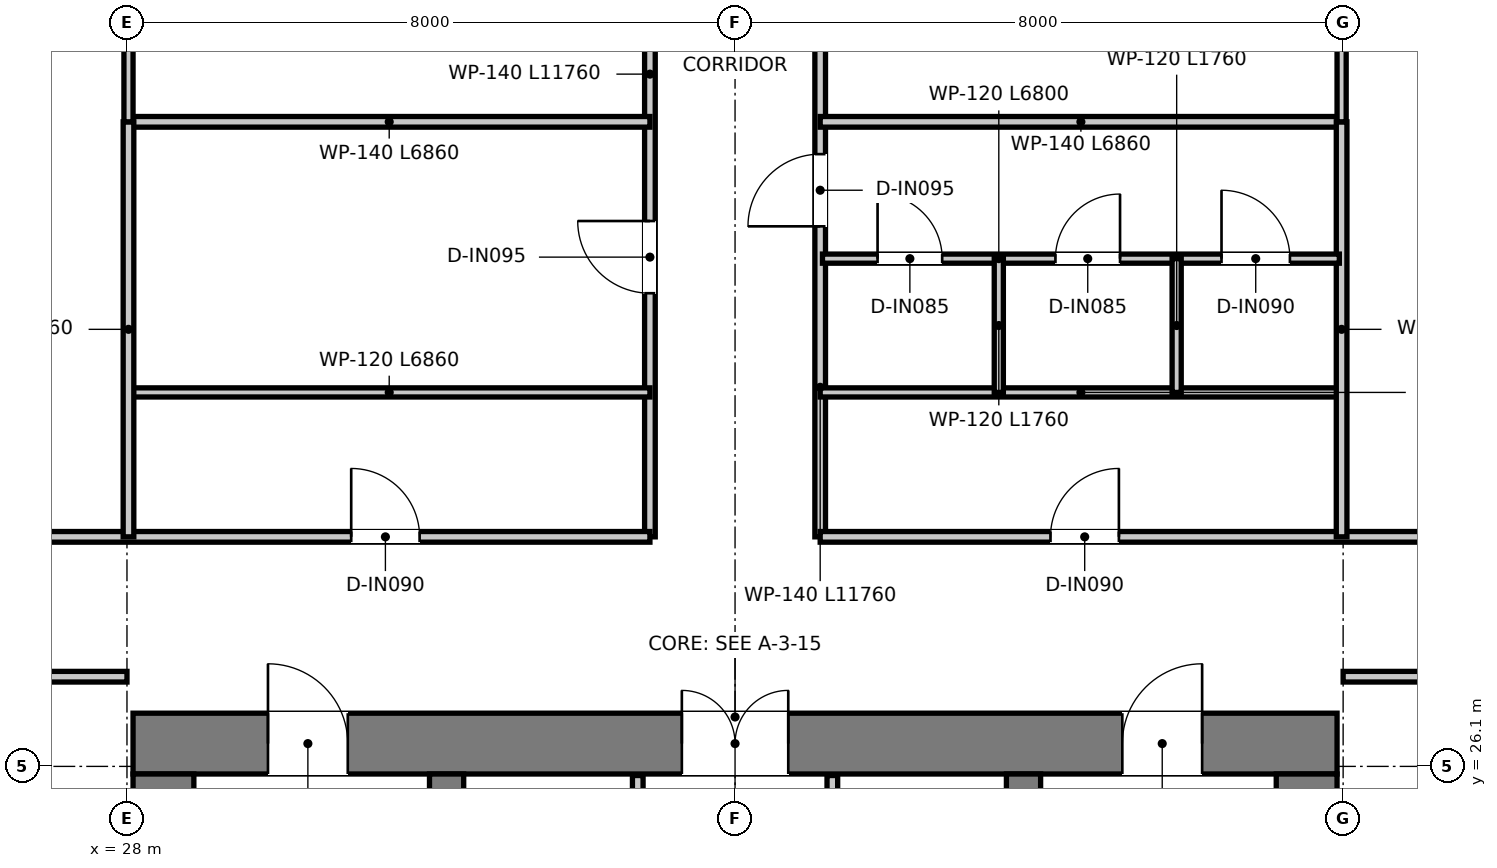
"""IFC4 building model, lengths in metres.
Left out: names, types, materials, properties, quantities, classifications, styles, units other than length and angle.
Written with IfcOpenShell. Run it as: python <this file> out.ifc"""

import sys

from ifc_helpers import new_model, si_unit, direction, frame, frame_2d, origin, place, context, subcontext, project, spatial, rectangle, extrude, element, fill, save


model = new_model("IFC4")
c1 = context("Model", 3, precision=1e-05, world=origin(), true_north=direction((0.0, 1.0)))
c2 = subcontext(c1, "Body", "Model", "MODEL_VIEW")
j1 = project(units=[si_unit("LENGTHUNIT", "METRE"), si_unit("PLANEANGLEUNIT", "RADIAN")], contexts=[c1])
p1 = place(None, origin())
s1 = spatial("IfcSite", under=j1, at=p1, CompositionType="ELEMENT")
p2 = place(p1, origin())
s2 = spatial("IfcBuilding", under=s1, at=p2, CompositionType="ELEMENT")
p3 = place(p2, frame((0.0, 0.0, 193.6)))
s3 = spatial("IfcBuildingStorey", under=s2, at=p3, CompositionType="ELEMENT", Elevation=193.6)
p4 = place(p3, frame((28.08, 26.4, 0.0), z_axis=(0.0, 0.0, 1.0), x_axis=(1.0, 0.0, 0.0)))
e1 = element("IfcWall", 1, at=p4, inside=s3, PredefinedType="SHEAR", context=c2, shape_type="SweptSolid", body=[
    extrude(rectangle(XDim=15.84, YDim=0.8, at=frame_2d((7.92, 0.0))), origin(), (0.0, 0.0, 1.0), 3.95),
])
p5 = place(p4, frame((7.22, 0.0, 0.0)))
e2 = element("IfcOpeningElement", 2, at=p5, cuts=e1, PredefinedType="OPENING", context=c2, shape_type="SweptSolid", body=[
    extrude(rectangle(XDim=1.4, YDim=2.2, at=frame_2d((0.7, 1.1))), frame((0.0, 0.41, 0.0), z_axis=(0.0, -1.0, 0.0), x_axis=(1.0, 0.0, 0.0)), (0.0, 0.0, 1.0), 0.82),
])
p6 = place(p4, frame((1.775, 0.0, 0.0)))
e3 = element("IfcOpeningElement", 3, at=p6, cuts=e1, PredefinedType="OPENING", context=c2, shape_type="SweptSolid", body=[
    extrude(rectangle(XDim=1.05, YDim=2.1, at=frame_2d((0.525, 1.05))), frame((0.0, 0.41, 0.0), z_axis=(0.0, -1.0, 0.0), x_axis=(1.0, 0.0, 0.0)), (0.0, 0.0, 1.0), 0.82),
])
p7 = place(p4, frame((13.015, 0.0, 0.0)))
e4 = element("IfcOpeningElement", 4, at=p7, cuts=e1, PredefinedType="OPENING", context=c2, shape_type="SweptSolid", body=[
    extrude(rectangle(XDim=1.05, YDim=2.1, at=frame_2d((0.525, 1.05))), frame((0.0, 0.41, 0.0), z_axis=(0.0, -1.0, 0.0), x_axis=(1.0, 0.0, 0.0)), (0.0, 0.0, 1.0), 0.82),
])
for number, where, z_axis, x_axis in (
    (5, (28.48, 11.3, 0.0), (0.0, 0.0, 1.0), (0.0, 1.0, 0.0)),
    (6, (43.52, 11.3, 0.0), (0.0, 0.0, 1.0), (0.0, 1.0, 0.0)),
):
    element("IfcWall", number, at=place(p3, frame(where, z_axis=z_axis, x_axis=x_axis)), inside=s3, PredefinedType="SHEAR", context=c2, shape_type="SweptSolid", body=[
        extrude(rectangle(XDim=14.7, YDim=0.8, at=frame_2d((7.35, 0.0))), origin(), (0.0, 0.0, 1.0), 3.95),
    ])
p8 = place(p3, frame((32.205, 13.22, 0.0), z_axis=(0.0, 0.0, 1.0), x_axis=(0.0, 1.0, 0.0)))
e7 = element("IfcWall", 7, at=p8, inside=s3, PredefinedType="SHEAR", context=c2, shape_type="SweptSolid", body=[
    extrude(rectangle(XDim=12.78, YDim=0.45, at=frame_2d((6.39, 0.0))), origin(), (0.0, 0.0, 1.0), 3.95),
])
p9 = place(p8, frame((10.58, 0.0, 0.0)))
e8 = element("IfcOpeningElement", 8, at=p9, cuts=e7, PredefinedType="OPENING", context=c2, shape_type="SweptSolid", body=[
    extrude(rectangle(XDim=1.1, YDim=2.15, at=frame_2d((0.55, 1.075))), frame((0.0, 0.235, 0.0), z_axis=(0.0, -1.0, 0.0), x_axis=(1.0, 0.0, 0.0)), (0.0, 0.0, 1.0), 0.47),
])
p10 = place(p3, frame((39.795, 13.22, 0.0), z_axis=(0.0, 0.0, 1.0), x_axis=(0.0, 1.0, 0.0)))
e9 = element("IfcWall", 9, at=p10, inside=s3, PredefinedType="SHEAR", context=c2, shape_type="SweptSolid", body=[
    extrude(rectangle(XDim=12.78, YDim=0.45, at=frame_2d((6.39, 0.0))), origin(), (0.0, 0.0, 1.0), 3.95),
])
p11 = place(p10, frame((10.58, 0.0, 0.0)))
e10 = element("IfcOpeningElement", 10, at=p11, cuts=e9, PredefinedType="OPENING", context=c2, shape_type="SweptSolid", body=[
    extrude(rectangle(XDim=1.1, YDim=2.15, at=frame_2d((0.55, 1.075))), frame((0.0, 0.235, 0.0), z_axis=(0.0, -1.0, 0.0), x_axis=(1.0, 0.0, 0.0)), (0.0, 0.0, 1.0), 0.47),
])
p12 = place(p3, frame((34.72, 20.2, 0.0), z_axis=(0.0, 0.0, 1.0), x_axis=(0.0, 1.0, 0.0)))
e11 = element("IfcWall", 11, at=p12, inside=s3, PredefinedType="PARTITIONING", context=c2, shape_type="SweptSolid", body=[
    extrude(rectangle(XDim=5.78, YDim=0.14, at=frame_2d((2.89, 0.0))), origin(), (0.0, 0.0, 1.0), 2.67),
])
p13 = place(p12, frame((1.05, 0.0, 0.0)))
e12 = element("IfcOpeningElement", 12, at=p13, cuts=e11, PredefinedType="OPENING", context=c2, shape_type="SweptSolid", body=[
    extrude(rectangle(XDim=0.9, YDim=2.1, at=frame_2d((0.45, 1.05))), frame((0.0, 0.08, 0.0), z_axis=(0.0, -1.0, 0.0), x_axis=(1.0, 0.0, 0.0)), (0.0, 0.0, 1.0), 0.16),
])
p14 = place(p3, frame((37.28, 20.2, 0.0), z_axis=(0.0, 0.0, 1.0), x_axis=(0.0, 1.0, 0.0)))
e13 = element("IfcWall", 13, at=p14, inside=s3, PredefinedType="PARTITIONING", context=c2, shape_type="SweptSolid", body=[
    extrude(rectangle(XDim=5.78, YDim=0.14, at=frame_2d((2.89, 0.0))), origin(), (0.0, 0.0, 1.0), 2.67),
])
p15 = place(p14, frame((0.95, 0.0, 0.0)))
e14 = element("IfcOpeningElement", 14, at=p15, cuts=e13, PredefinedType="OPENING", context=c2, shape_type="SweptSolid", body=[
    extrude(rectangle(XDim=1.1, YDim=2.15, at=frame_2d((0.55, 1.075))), frame((0.0, 0.08, 0.0), z_axis=(0.0, -1.0, 0.0), x_axis=(1.0, 0.0, 0.0)), (0.0, 0.0, 1.0), 0.16),
])
p16 = place(p3, frame((34.88, 29.12, 0.0), z_axis=(0.0, 0.0, 1.0), x_axis=(0.0, 1.0, 0.0)))
e15 = element("IfcWall", 15, at=p16, inside=s3, PredefinedType="PARTITIONING", context=c2, shape_type="SweptSolid", body=[
    extrude(rectangle(XDim=11.76, YDim=0.14, at=frame_2d((5.88, 0.0))), origin(), (0.0, 0.0, 1.0), 3.03),
])
p17 = place(p16, frame((3.205, 0.0, 0.0)))
e16 = element("IfcOpeningElement", 16, at=p17, cuts=e15, PredefinedType="OPENING", context=c2, shape_type="SweptSolid", body=[
    extrude(rectangle(XDim=0.95, YDim=2.1, at=frame_2d((0.475, 1.05))), frame((0.0, 0.08, 0.0), z_axis=(0.0, -1.0, 0.0), x_axis=(1.0, 0.0, 0.0)), (0.0, 0.0, 1.0), 0.16),
])
p18 = place(p16, frame((8.02, 0.0, 0.0)))
e17 = element("IfcOpeningElement", 17, at=p18, cuts=e15, PredefinedType="OPENING", context=c2, shape_type="SweptSolid", body=[
    extrude(rectangle(XDim=0.9, YDim=2.1, at=frame_2d((0.45, 1.05))), frame((0.0, 0.08, 0.0), z_axis=(0.0, -1.0, 0.0), x_axis=(1.0, 0.0, 0.0)), (0.0, 0.0, 1.0), 0.16),
])
p19 = place(p3, frame((37.12, 29.12, 0.0), z_axis=(0.0, 0.0, 1.0), x_axis=(0.0, 1.0, 0.0)))
e18 = element("IfcWall", 18, at=p19, inside=s3, PredefinedType="PARTITIONING", context=c2, shape_type="SweptSolid", body=[
    extrude(rectangle(XDim=11.76, YDim=0.14, at=frame_2d((5.88, 0.0))), origin(), (0.0, 0.0, 1.0), 3.03),
])
p20 = place(p19, frame((4.085, 0.0, 0.0)))
e19 = element("IfcOpeningElement", 19, at=p20, cuts=e18, PredefinedType="OPENING", context=c2, shape_type="SweptSolid", body=[
    extrude(rectangle(XDim=0.95, YDim=2.1, at=frame_2d((0.475, 1.05))), frame((0.0, 0.08, 0.0), z_axis=(0.0, -1.0, 0.0), x_axis=(1.0, 0.0, 0.0)), (0.0, 0.0, 1.0), 0.16),
])
p21 = place(p19, frame((8.02, 0.0, 0.0)))
e20 = element("IfcOpeningElement", 20, at=p21, cuts=e18, PredefinedType="OPENING", context=c2, shape_type="SweptSolid", body=[
    extrude(rectangle(XDim=0.9, YDim=2.1, at=frame_2d((0.45, 1.05))), frame((0.0, 0.08, 0.0), z_axis=(0.0, -1.0, 0.0), x_axis=(1.0, 0.0, 0.0)), (0.0, 0.0, 1.0), 0.16),
])
p22 = place(p3, frame((10.765, 29.12, 0.0), z_axis=(0.0, 0.0, 1.0), x_axis=(1.0, 0.0, 0.0)))
e21 = element("IfcWall", 21, at=p22, inside=s3, PredefinedType="PARTITIONING", context=c2, shape_type="SweptSolid", body=[
    extrude(rectangle(XDim=24.115, YDim=0.14, at=frame_2d((12.058, 0.0))), origin(), (0.0, 0.0, 1.0), 3.03),
])
p23 = place(p22, frame((20.185, 0.0, 0.0)))
e22 = element("IfcOpeningElement", 22, at=p23, cuts=e21, PredefinedType="OPENING", context=c2, shape_type="SweptSolid", body=[
    extrude(rectangle(XDim=0.9, YDim=2.1, at=frame_2d((0.45, 1.05))), frame((0.0, 0.08, 0.0), z_axis=(0.0, -1.0, 0.0), x_axis=(1.0, 0.0, 0.0)), (0.0, 0.0, 1.0), 0.16),
])
p24 = place(p22, frame((4.115, 0.0, 0.0)))
e23 = element("IfcOpeningElement", 23, at=p24, cuts=e21, PredefinedType="OPENING", context=c2, shape_type="SweptSolid", body=[
    extrude(rectangle(XDim=0.9, YDim=2.1, at=frame_2d((0.45, 1.05))), frame((0.0, 0.08, 0.0), z_axis=(0.0, -1.0, 0.0), x_axis=(1.0, 0.0, 0.0)), (0.0, 0.0, 1.0), 0.16),
])
p25 = place(p22, frame((11.935, 0.0, 0.0)))
e24 = element("IfcOpeningElement", 24, at=p25, cuts=e21, PredefinedType="OPENING", context=c2, shape_type="SweptSolid", body=[
    extrude(rectangle(XDim=0.9, YDim=2.1, at=frame_2d((0.45, 1.05))), frame((0.0, 0.08, 0.0), z_axis=(0.0, -1.0, 0.0), x_axis=(1.0, 0.0, 0.0)), (0.0, 0.0, 1.0), 0.16),
])
p26 = place(p22, frame((14.985, 0.0, 0.0)))
e25 = element("IfcOpeningElement", 25, at=p26, cuts=e21, PredefinedType="OPENING", context=c2, shape_type="SweptSolid", body=[
    extrude(rectangle(XDim=0.9, YDim=2.1, at=frame_2d((0.45, 1.05))), frame((0.0, 0.08, 0.0), z_axis=(0.0, -1.0, 0.0), x_axis=(1.0, 0.0, 0.0)), (0.0, 0.0, 1.0), 0.16),
])
p27 = place(p3, frame((37.12, 29.12, 0.0), z_axis=(0.0, 0.0, 1.0), x_axis=(1.0, 0.0, 0.0)))
e26 = element("IfcWall", 26, at=p27, inside=s3, PredefinedType="PARTITIONING", context=c2, shape_type="SweptSolid", body=[
    extrude(rectangle(XDim=24.697, YDim=0.14, at=frame_2d((12.348, 0.0))), origin(), (0.0, 0.0, 1.0), 3.03),
])
p28 = place(p27, frame((3.03, 0.0, 0.0)))
e27 = element("IfcOpeningElement", 27, at=p28, cuts=e26, PredefinedType="OPENING", context=c2, shape_type="SweptSolid", body=[
    extrude(rectangle(XDim=0.9, YDim=2.1, at=frame_2d((0.45, 1.05))), frame((0.0, 0.08, 0.0), z_axis=(0.0, -1.0, 0.0), x_axis=(1.0, 0.0, 0.0)), (0.0, 0.0, 1.0), 0.16),
])
p29 = place(p27, frame((9.17, 0.0, 0.0)))
e28 = element("IfcOpeningElement", 28, at=p29, cuts=e26, PredefinedType="OPENING", context=c2, shape_type="SweptSolid", body=[
    extrude(rectangle(XDim=0.9, YDim=2.1, at=frame_2d((0.45, 1.05))), frame((0.0, 0.08, 0.0), z_axis=(0.0, -1.0, 0.0), x_axis=(1.0, 0.0, 0.0)), (0.0, 0.0, 1.0), 0.16),
])
p30 = place(p27, frame((18.6, 0.0, 0.0)))
e29 = element("IfcOpeningElement", 29, at=p30, cuts=e26, PredefinedType="OPENING", context=c2, shape_type="SweptSolid", body=[
    extrude(rectangle(XDim=0.9, YDim=2.1, at=frame_2d((0.45, 1.05))), frame((0.0, 0.08, 0.0), z_axis=(0.0, -1.0, 0.0), x_axis=(1.0, 0.0, 0.0)), (0.0, 0.0, 1.0), 0.16),
])
p31 = place(p3, frame((9.422, 27.28, 0.0), z_axis=(0.0, 0.0, 1.0), x_axis=(1.0, 0.0, 0.0)))
e30 = element("IfcWall", 30, at=p31, inside=s3, PredefinedType="PARTITIONING", context=c2, shape_type="SweptSolid", body=[
    extrude(rectangle(XDim=18.578, YDim=0.14, at=frame_2d((9.289, 0.0))), origin(), (0.0, 0.0, 1.0), 3.03),
])
p32 = place(p31, frame((6.608, 0.0, 0.0)))
e31 = element("IfcOpeningElement", 31, at=p32, cuts=e30, PredefinedType="OPENING", context=c2, shape_type="SweptSolid", body=[
    extrude(rectangle(XDim=0.9, YDim=2.1, at=frame_2d((0.45, 1.05))), frame((0.0, 0.08, 0.0), z_axis=(0.0, -1.0, 0.0), x_axis=(1.0, 0.0, 0.0)), (0.0, 0.0, 1.0), 0.16),
])
p33 = place(p31, frame((15.728, 0.0, 0.0)))
e32 = element("IfcOpeningElement", 32, at=p33, cuts=e30, PredefinedType="OPENING", context=c2, shape_type="SweptSolid", body=[
    extrude(rectangle(XDim=0.9, YDim=2.1, at=frame_2d((0.45, 1.05))), frame((0.0, 0.08, 0.0), z_axis=(0.0, -1.0, 0.0), x_axis=(1.0, 0.0, 0.0)), (0.0, 0.0, 1.0), 0.16),
])
p34 = place(p3, frame((44.0, 27.28, 0.0), z_axis=(0.0, 0.0, 1.0), x_axis=(1.0, 0.0, 0.0)))
e33 = element("IfcWall", 33, at=p34, inside=s3, PredefinedType="PARTITIONING", context=c2, shape_type="SweptSolid", body=[
    extrude(rectangle(XDim=19.425, YDim=0.14, at=frame_2d((9.712, 0.0))), origin(), (0.0, 0.0, 1.0), 3.03),
])
p35 = place(p34, frame((2.1, 0.0, 0.0)))
e34 = element("IfcOpeningElement", 34, at=p35, cuts=e33, PredefinedType="OPENING", context=c2, shape_type="SweptSolid", body=[
    extrude(rectangle(XDim=0.9, YDim=2.1, at=frame_2d((0.45, 1.05))), frame((0.0, 0.08, 0.0), z_axis=(0.0, -1.0, 0.0), x_axis=(1.0, 0.0, 0.0)), (0.0, 0.0, 1.0), 0.16),
])
p36 = place(p34, frame((11.22, 0.0, 0.0)))
e35 = element("IfcOpeningElement", 35, at=p36, cuts=e33, PredefinedType="OPENING", context=c2, shape_type="SweptSolid", body=[
    extrude(rectangle(XDim=0.9, YDim=2.1, at=frame_2d((0.45, 1.05))), frame((0.0, 0.08, 0.0), z_axis=(0.0, -1.0, 0.0), x_axis=(1.0, 0.0, 0.0)), (0.0, 0.0, 1.0), 0.16),
])
for number, where, z_axis, x_axis in (
    (36, (28.02, 31.02, 0.0), (0.0, 0.0, 1.0), (1.0, 0.0, 0.0)),
    (37, (37.12, 31.02, 0.0), (0.0, 0.0, 1.0), (1.0, 0.0, 0.0)),
):
    element("IfcWall", number, at=place(p3, frame(where, z_axis=z_axis, x_axis=x_axis)), inside=s3, PredefinedType="PARTITIONING", context=c2, shape_type="SweptSolid", body=[
        extrude(rectangle(XDim=6.86, YDim=0.12, at=frame_2d((3.43, 0.0))), origin(), (0.0, 0.0, 1.0), 3.08),
    ])
for number, where, z_axis, x_axis in (
    (38, (28.02, 34.58, 0.0), (0.0, 0.0, 1.0), (1.0, 0.0, 0.0)),
    (39, (37.12, 34.58, 0.0), (0.0, 0.0, 1.0), (1.0, 0.0, 0.0)),
):
    element("IfcWall", number, at=place(p3, frame(where, z_axis=z_axis, x_axis=x_axis)), inside=s3, PredefinedType="PARTITIONING", context=c2, shape_type="SweptSolid", body=[
        extrude(rectangle(XDim=6.86, YDim=0.14, at=frame_2d((3.43, 0.0))), origin(), (0.0, 0.0, 1.0), 3.08),
    ])
for number, where, z_axis, x_axis in (
    (40, (28.02, 29.12, 0.0), (0.0, 0.0, 1.0), (0.0, 1.0, 0.0)),
    (41, (43.98, 29.12, 0.0), (0.0, 0.0, 1.0), (0.0, 1.0, 0.0)),
):
    element("IfcWall", number, at=place(p3, frame(where, z_axis=z_axis, x_axis=x_axis)), inside=s3, PredefinedType="PARTITIONING", context=c2, shape_type="SweptSolid", body=[
        extrude(rectangle(XDim=5.46, YDim=0.14, at=frame_2d((2.73, 0.0))), origin(), (0.0, 0.0, 1.0), 3.31),
    ])
p37 = place(p3, frame((37.15, 32.78, 0.0), z_axis=(0.0, 0.0, 1.0), x_axis=(1.0, 0.0, 0.0)))
e42 = element("IfcWall", 42, at=p37, inside=s3, PredefinedType="PARTITIONING", context=c2, shape_type="SweptSolid", body=[
    extrude(rectangle(XDim=6.8, YDim=0.12, at=frame_2d((3.4, 0.0))), origin(), (0.0, 0.0, 1.0), 3.08),
])
p38 = place(p37, frame((0.725, 0.0, 0.0)))
e43 = element("IfcOpeningElement", 43, at=p38, cuts=e42, PredefinedType="OPENING", context=c2, shape_type="SweptSolid", body=[
    extrude(rectangle(XDim=0.85, YDim=2.1, at=frame_2d((0.425, 1.05))), frame((0.0, 0.07, 0.0), z_axis=(0.0, -1.0, 0.0), x_axis=(1.0, 0.0, 0.0)), (0.0, 0.0, 1.0), 0.14),
])
p39 = place(p37, frame((3.065, 0.0, 0.0)))
e44 = element("IfcOpeningElement", 44, at=p39, cuts=e42, PredefinedType="OPENING", context=c2, shape_type="SweptSolid", body=[
    extrude(rectangle(XDim=0.85, YDim=2.1, at=frame_2d((0.425, 1.05))), frame((0.0, 0.07, 0.0), z_axis=(0.0, -1.0, 0.0), x_axis=(1.0, 0.0, 0.0)), (0.0, 0.0, 1.0), 0.14),
])
p40 = place(p37, frame((5.25, 0.0, 0.0)))
e45 = element("IfcOpeningElement", 45, at=p40, cuts=e42, PredefinedType="OPENING", context=c2, shape_type="SweptSolid", body=[
    extrude(rectangle(XDim=0.9, YDim=2.1, at=frame_2d((0.45, 1.05))), frame((0.0, 0.07, 0.0), z_axis=(0.0, -1.0, 0.0), x_axis=(1.0, 0.0, 0.0)), (0.0, 0.0, 1.0), 0.14),
])
for number, where, z_axis, x_axis in (
    (46, (39.47, 31.02, 0.0), (0.0, 0.0, 1.0), (0.0, 1.0, 0.0)),
    (47, (41.81, 31.02, 0.0), (0.0, 0.0, 1.0), (0.0, 1.0, 0.0)),
):
    element("IfcWall", number, at=place(p3, frame(where, z_axis=z_axis, x_axis=x_axis)), inside=s3, PredefinedType="PARTITIONING", context=c2, shape_type="SweptSolid", body=[
        extrude(rectangle(XDim=1.76, YDim=0.12, at=frame_2d((0.88, 0.0))), origin(), (0.0, 0.0, 1.0), 3.67),
    ])
p41 = place(p3, frame((28.02, 34.58, 0.0), z_axis=(0.0, 0.0, 1.0), x_axis=(0.0, 1.0, 0.0)))
e48 = element("IfcWall", 48, at=p41, inside=s3, PredefinedType="PARTITIONING", context=c2, shape_type="SweptSolid", body=[
    extrude(rectangle(XDim=18.181, YDim=0.12, at=frame_2d((9.09, 0.0))), origin(), (0.0, 0.0, 1.0), 3.03),
])
p42 = place(p3, frame((43.98, 34.58, 0.0), z_axis=(0.0, 0.0, 1.0), x_axis=(0.0, 1.0, 0.0)))
e49 = element("IfcWall", 49, at=p42, inside=s3, PredefinedType="PARTITIONING", context=c2, shape_type="SweptSolid", body=[
    extrude(rectangle(XDim=13.297, YDim=0.12, at=frame_2d((6.648, 0.0))), origin(), (0.0, 0.0, 1.0), 3.03),
])
p43 = place(p5, origin())
e50 = element("IfcDoor", 50, at=p43, inside=s3, OperationType="DOUBLE_DOOR_SINGLE_SWING", PredefinedType="DOOR", context=c2, shape_type="SweptSolid", body=[
    extrude(rectangle(XDim=1.4, YDim=2.2, at=frame_2d((0.7, 1.1))), frame((0.0, 0.025, 0.0), z_axis=(0.0, -1.0, 0.0), x_axis=(1.0, 0.0, 0.0)), (0.0, 0.0, 1.0), 0.05),
])
fill(e2, e50)
p44 = place(p6, origin())
e51 = element("IfcDoor", 51, at=p44, inside=s3, OperationType="SINGLE_SWING_LEFT", PredefinedType="DOOR", context=c2, shape_type="SweptSolid", body=[
    extrude(rectangle(XDim=1.05, YDim=2.1, at=frame_2d((0.525, 1.05))), frame((0.0, 0.025, 0.0), z_axis=(0.0, -1.0, 0.0), x_axis=(1.0, 0.0, 0.0)), (0.0, 0.0, 1.0), 0.05),
])
fill(e3, e51)
p45 = place(p7, origin())
e52 = element("IfcDoor", 52, at=p45, inside=s3, OperationType="SINGLE_SWING_RIGHT", PredefinedType="DOOR", context=c2, shape_type="SweptSolid", body=[
    extrude(rectangle(XDim=1.05, YDim=2.1, at=frame_2d((0.525, 1.05))), frame((0.0, 0.025, 0.0), z_axis=(0.0, -1.0, 0.0), x_axis=(1.0, 0.0, 0.0)), (0.0, 0.0, 1.0), 0.05),
])
fill(e4, e52)
p46 = place(p23, origin())
e53 = element("IfcDoor", 53, at=p46, inside=s3, OperationType="SINGLE_SWING_LEFT", PredefinedType="DOOR", context=c2, shape_type="SweptSolid", body=[
    extrude(rectangle(XDim=0.9, YDim=2.1, at=frame_2d((0.45, 1.05))), frame((0.0, 0.025, 0.0), z_axis=(0.0, -1.0, 0.0), x_axis=(1.0, 0.0, 0.0)), (0.0, 0.0, 1.0), 0.05),
])
fill(e22, e53)
p47 = place(p28, origin())
e54 = element("IfcDoor", 54, at=p47, inside=s3, OperationType="SINGLE_SWING_RIGHT", PredefinedType="DOOR", context=c2, shape_type="SweptSolid", body=[
    extrude(rectangle(XDim=0.9, YDim=2.1, at=frame_2d((0.45, 1.05))), frame((0.0, 0.025, 0.0), z_axis=(0.0, -1.0, 0.0), x_axis=(1.0, 0.0, 0.0)), (0.0, 0.0, 1.0), 0.05),
])
fill(e27, e54)
p48 = place(p20, origin())
e55 = element("IfcDoor", 55, at=p48, inside=s3, OperationType="SINGLE_SWING_LEFT", PredefinedType="DOOR", context=c2, shape_type="SweptSolid", body=[
    extrude(rectangle(XDim=0.95, YDim=2.1, at=frame_2d((0.475, 1.05))), frame((0.0, 0.025, 0.0), z_axis=(0.0, -1.0, 0.0), x_axis=(1.0, 0.0, 0.0)), (0.0, 0.0, 1.0), 0.05),
])
fill(e19, e55)
p49 = place(p17, origin())
e56 = element("IfcDoor", 56, at=p49, inside=s3, OperationType="SINGLE_SWING_RIGHT", PredefinedType="DOOR", context=c2, shape_type="SweptSolid", body=[
    extrude(rectangle(XDim=0.95, YDim=2.1, at=frame_2d((0.475, 1.05))), frame((0.0, 0.025, 0.0), z_axis=(0.0, -1.0, 0.0), x_axis=(1.0, 0.0, 0.0)), (0.0, 0.0, 1.0), 0.05),
])
fill(e16, e56)
p50 = place(p38, origin())
e57 = element("IfcDoor", 57, at=p50, inside=s3, OperationType="SINGLE_SWING_LEFT", PredefinedType="DOOR", context=c2, shape_type="SweptSolid", body=[
    extrude(rectangle(XDim=0.85, YDim=2.1, at=frame_2d((0.425, 1.05))), frame((0.0, 0.025, 0.0), z_axis=(0.0, -1.0, 0.0), x_axis=(1.0, 0.0, 0.0)), (0.0, 0.0, 1.0), 0.05),
])
fill(e43, e57)
p51 = place(p39, origin())
e58 = element("IfcDoor", 58, at=p51, inside=s3, OperationType="SINGLE_SWING_RIGHT", PredefinedType="DOOR", context=c2, shape_type="SweptSolid", body=[
    extrude(rectangle(XDim=0.85, YDim=2.1, at=frame_2d((0.425, 1.05))), frame((0.0, 0.025, 0.0), z_axis=(0.0, -1.0, 0.0), x_axis=(1.0, 0.0, 0.0)), (0.0, 0.0, 1.0), 0.05),
])
fill(e44, e58)
p52 = place(p40, origin())
e59 = element("IfcDoor", 59, at=p52, inside=s3, OperationType="SINGLE_SWING_LEFT", PredefinedType="DOOR", context=c2, shape_type="SweptSolid", body=[
    extrude(rectangle(XDim=0.9, YDim=2.1, at=frame_2d((0.45, 1.05))), frame((0.0, 0.025, 0.0), z_axis=(0.0, -1.0, 0.0), x_axis=(1.0, 0.0, 0.0)), (0.0, 0.0, 1.0), 0.05),
])
fill(e45, e59)
save(model, sys.argv[1])
